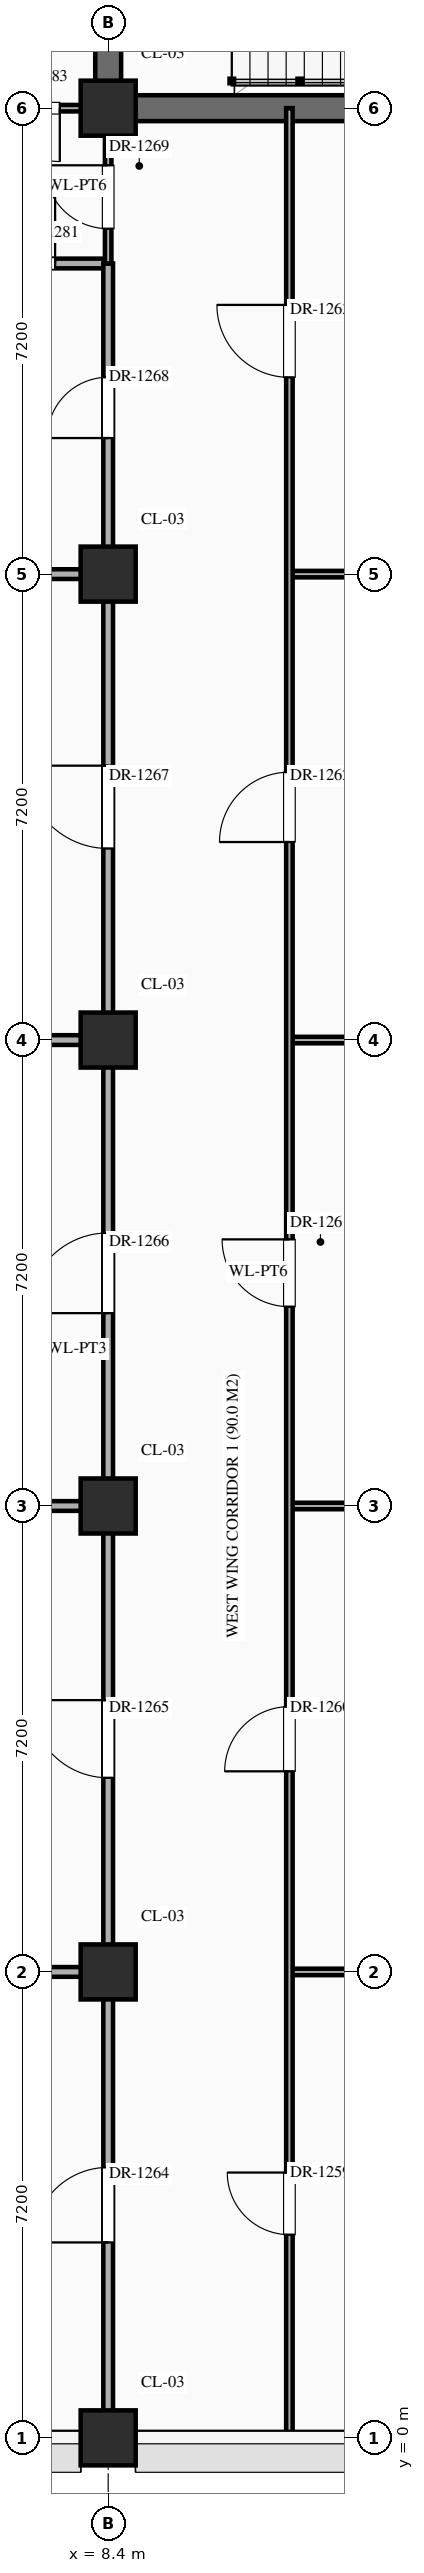
"""IFC4 building model, lengths in metres.
Left out: names, types, materials, properties, quantities, classifications, styles, units other than length and angle.
Written with IfcOpenShell. Run it as: python <this file> out.ifc"""

import sys

from ifc_helpers import new_model, si_unit, direction, frame, frame_2d, origin, origin_2d, place, context, subcontext, project, spatial, rectangle, extrude, element, fill, save


model = new_model("IFC4")
c1 = context("Model", 3, precision=1e-05, world=origin(), true_north=direction((0.0, 1.0)))
c2 = subcontext(c1, "Body", "Model", "MODEL_VIEW")
j1 = project(units=[si_unit("LENGTHUNIT", "METRE"), si_unit("PLANEANGLEUNIT", "RADIAN")], contexts=[c1])
p1 = place(None, origin())
s1 = spatial("IfcSite", under=j1, at=p1, CompositionType="ELEMENT")
p2 = place(p1, origin())
s2 = spatial("IfcBuilding", under=s1, at=p2, CompositionType="ELEMENT")
p3 = place(p2, frame((0.0, 0.0, 5.4)))
s3 = spatial("IfcBuildingStorey", under=s2, at=p3, CompositionType="ELEMENT", Elevation=5.4)
for number, where, z_axis, x_axis in (
    (1, (8.4, 0.0, 0.0), (0.0, 0.0, 1.0), (1.0, 0.0, 0.0)),
    (2, (8.4, 7.2, 0.0), (0.0, 0.0, 1.0), (1.0, 0.0, 0.0)),
    (3, (8.4, 14.4, 0.0), (0.0, 0.0, 1.0), (1.0, 0.0, 0.0)),
    (4, (8.4, 21.6, 0.0), (0.0, 0.0, 1.0), (1.0, 0.0, 0.0)),
    (5, (8.4, 28.8, 0.0), (0.0, 0.0, 1.0), (1.0, 0.0, 0.0)),
    (6, (8.4, 36.0, 0.0), (0.0, 0.0, 1.0), (1.0, 0.0, 0.0)),
):
    element("IfcColumn", number, at=place(p3, frame(where, z_axis=z_axis, x_axis=x_axis)), inside=s3, PredefinedType="COLUMN", context=c2, shape_type="SweptSolid", body=[
        extrude(rectangle(XDim=0.85, YDim=0.85, at=origin_2d()), origin(), (0.0, 0.0, 1.0), 5.4),
    ])
p4 = place(p3, frame((0.04, 7.2, 0.0), z_axis=(0.0, 0.0, 1.0), x_axis=(1.0, 0.0, 0.0)))
e7 = element("IfcWall", 7, at=p4, inside=s3, PredefinedType="STANDARD", context=c2, shape_type="SweptSolid", body=[
    extrude(rectangle(XDim=8.36, YDim=0.15, at=frame_2d((4.18, 0.0))), origin(), (0.0, 0.0, 1.0), 4.2),
])
p5 = place(p3, frame((11.2, 7.2, 0.0), z_axis=(0.0, 0.0, 1.0), x_axis=(1.0, 0.0, 0.0)))
e8 = element("IfcWall", 8, at=p5, inside=s3, PredefinedType="STANDARD", context=c2, shape_type="SweptSolid", body=[
    extrude(rectangle(XDim=5.56, YDim=0.1, at=frame_2d((2.78, 0.0))), origin(), (0.0, 0.0, 1.0), 4.2),
])
p6 = place(p3, frame((0.04, 14.4, 0.0), z_axis=(0.0, 0.0, 1.0), x_axis=(1.0, 0.0, 0.0)))
e9 = element("IfcWall", 9, at=p6, inside=s3, PredefinedType="STANDARD", context=c2, shape_type="SweptSolid", body=[
    extrude(rectangle(XDim=8.36, YDim=0.15, at=frame_2d((4.18, 0.0))), origin(), (0.0, 0.0, 1.0), 4.2),
])
p7 = place(p3, frame((11.2, 14.4, 0.0), z_axis=(0.0, 0.0, 1.0), x_axis=(1.0, 0.0, 0.0)))
e10 = element("IfcWall", 10, at=p7, inside=s3, PredefinedType="STANDARD", context=c2, shape_type="SweptSolid", body=[
    extrude(rectangle(XDim=5.56, YDim=0.1, at=frame_2d((2.78, 0.0))), origin(), (0.0, 0.0, 1.0), 4.2),
])
p8 = place(p3, frame((0.04, 21.6, 0.0), z_axis=(0.0, 0.0, 1.0), x_axis=(1.0, 0.0, 0.0)))
e11 = element("IfcWall", 11, at=p8, inside=s3, PredefinedType="STANDARD", context=c2, shape_type="SweptSolid", body=[
    extrude(rectangle(XDim=8.36, YDim=0.15, at=frame_2d((4.18, 0.0))), origin(), (0.0, 0.0, 1.0), 4.2),
])
p9 = place(p3, frame((11.2, 21.6, 0.0), z_axis=(0.0, 0.0, 1.0), x_axis=(1.0, 0.0, 0.0)))
e12 = element("IfcWall", 12, at=p9, inside=s3, PredefinedType="STANDARD", context=c2, shape_type="SweptSolid", body=[
    extrude(rectangle(XDim=5.56, YDim=0.1, at=frame_2d((2.78, 0.0))), origin(), (0.0, 0.0, 1.0), 4.2),
])
p10 = place(p3, frame((0.04, 28.8, 0.0), z_axis=(0.0, 0.0, 1.0), x_axis=(1.0, 0.0, 0.0)))
e13 = element("IfcWall", 13, at=p10, inside=s3, PredefinedType="STANDARD", context=c2, shape_type="SweptSolid", body=[
    extrude(rectangle(XDim=8.36, YDim=0.15, at=frame_2d((4.18, 0.0))), origin(), (0.0, 0.0, 1.0), 4.2),
])
p11 = place(p3, frame((11.2, 28.8, 0.0), z_axis=(0.0, 0.0, 1.0), x_axis=(1.0, 0.0, 0.0)))
e14 = element("IfcWall", 14, at=p11, inside=s3, PredefinedType="STANDARD", context=c2, shape_type="SweptSolid", body=[
    extrude(rectangle(XDim=5.56, YDim=0.1, at=frame_2d((2.78, 0.0))), origin(), (0.0, 0.0, 1.0), 4.2),
])
p12 = place(p3, frame((0.04, 33.6, 0.0), z_axis=(0.0, 0.0, 1.0), x_axis=(1.0, 0.0, 0.0)))
e15 = element("IfcWall", 15, at=p12, inside=s3, PredefinedType="STANDARD", context=c2, shape_type="SweptSolid", body=[
    extrude(rectangle(XDim=8.36, YDim=0.15, at=frame_2d((4.18, 0.0))), origin(), (0.0, 0.0, 1.0), 5.05),
])
p13 = place(p12, frame((6.38, 0.0, 0.0)))
e16 = element("IfcOpeningElement", 16, at=p13, cuts=e15, PredefinedType="OPENING", context=c2, shape_type="SweptSolid", body=[
    extrude(rectangle(XDim=1.16, YDim=2.3, at=frame_2d((0.58, 1.15))), frame((0.0, 0.087, 0.0), z_axis=(0.0, -1.0, 0.0), x_axis=(1.0, 0.0, 0.0)), (0.0, 0.0, 1.0), 0.174),
])
p14 = place(p3, frame((0.04, 36.0, 0.0), z_axis=(0.0, 0.0, 1.0), x_axis=(1.0, 0.0, 0.0)))
e17 = element("IfcWall", 17, at=p14, inside=s3, PredefinedType="STANDARD", context=c2, shape_type="SweptSolid", body=[
    extrude(rectangle(XDim=8.36, YDim=0.1, at=frame_2d((4.18, 0.0))), origin(), (0.0, 0.0, 1.0), 4.2),
])
p15 = place(p14, frame((5.962, 0.0, 0.0)))
e18 = element("IfcOpeningElement", 18, at=p15, cuts=e17, PredefinedType="OPENING", context=c2, shape_type="SweptSolid", body=[
    extrude(rectangle(XDim=1.65, YDim=2.4, at=frame_2d((0.825, 1.2))), frame((0.0, 0.062, 0.0), z_axis=(0.0, -1.0, 0.0), x_axis=(1.0, 0.0, 0.0)), (0.0, 0.0, 1.0), 0.124),
])
p16 = place(p3, frame((8.4, 36.0, 0.0), z_axis=(0.0, 0.0, 1.0), x_axis=(1.0, 0.0, 0.0)))
e19 = element("IfcWall", 19, at=p16, inside=s3, PredefinedType="SHEAR", context=c2, shape_type="SweptSolid", body=[
    extrude(rectangle(XDim=8.36, YDim=0.4, at=frame_2d((4.18, 0.0))), origin(), (0.0, 0.0, 1.0), 5.05),
])
p17 = place(p3, frame((8.4, 0.04, 0.0), z_axis=(0.0, 0.0, 1.0), x_axis=(0.0, 1.0, 0.0)))
e20 = element("IfcWall", 20, at=p17, inside=s3, PredefinedType="STANDARD", context=c2, shape_type="SweptSolid", body=[
    extrude(rectangle(XDim=33.56, YDim=0.15, at=frame_2d((16.78, 0.0))), origin(), (0.0, 0.0, 1.0), 4.3),
])
p18 = place(p17, frame((2.98, 0.0, 0.0)))
e21 = element("IfcOpeningElement", 21, at=p18, cuts=e20, PredefinedType="OPENING", context=c2, shape_type="SweptSolid", body=[
    extrude(rectangle(XDim=1.16, YDim=2.3, at=frame_2d((0.58, 1.15))), frame((0.0, 0.087, 0.0), z_axis=(0.0, -1.0, 0.0), x_axis=(1.0, 0.0, 0.0)), (0.0, 0.0, 1.0), 0.174),
])
p19 = place(p17, frame((10.16, 0.0, 0.0)))
e22 = element("IfcOpeningElement", 22, at=p19, cuts=e20, PredefinedType="OPENING", context=c2, shape_type="SweptSolid", body=[
    extrude(rectangle(XDim=1.2, YDim=2.35, at=frame_2d((0.6, 1.175))), frame((0.0, 0.087, 0.0), z_axis=(0.0, -1.0, 0.0), x_axis=(1.0, 0.0, 0.0)), (0.0, 0.0, 1.0), 0.174),
])
p20 = place(p17, frame((17.34, 0.0, 0.0)))
e23 = element("IfcOpeningElement", 23, at=p20, cuts=e20, PredefinedType="OPENING", context=c2, shape_type="SweptSolid", body=[
    extrude(rectangle(XDim=1.24, YDim=2.3, at=frame_2d((0.62, 1.15))), frame((0.0, 0.087, 0.0), z_axis=(0.0, -1.0, 0.0), x_axis=(1.0, 0.0, 0.0)), (0.0, 0.0, 1.0), 0.174),
])
p21 = place(p17, frame((24.52, 0.0, 0.0)))
e24 = element("IfcOpeningElement", 24, at=p21, cuts=e20, PredefinedType="OPENING", context=c2, shape_type="SweptSolid", body=[
    extrude(rectangle(XDim=1.28, YDim=2.35, at=frame_2d((0.64, 1.175))), frame((0.0, 0.087, 0.0), z_axis=(0.0, -1.0, 0.0), x_axis=(1.0, 0.0, 0.0)), (0.0, 0.0, 1.0), 0.174),
])
p22 = place(p17, frame((30.863, 0.0, 0.0)))
e25 = element("IfcOpeningElement", 25, at=p22, cuts=e20, PredefinedType="OPENING", context=c2, shape_type="SweptSolid", body=[
    extrude(rectangle(XDim=0.94, YDim=2.3, at=frame_2d((0.47, 1.15))), frame((0.0, 0.087, 0.0), z_axis=(0.0, -1.0, 0.0), x_axis=(1.0, 0.0, 0.0)), (0.0, 0.0, 1.0), 0.174),
])
p23 = place(p3, frame((8.4, 33.6, 0.0), z_axis=(0.0, 0.0, 1.0), x_axis=(0.0, 1.0, 0.0)))
e26 = element("IfcWall", 26, at=p23, inside=s3, PredefinedType="STANDARD", context=c2, shape_type="SweptSolid", body=[
    extrude(rectangle(XDim=2.4, YDim=0.1, at=frame_2d((1.2, 0.0))), origin(), (0.0, 0.0, 1.0), 4.3),
])
p24 = place(p23, frame((0.538, 0.0, 0.0)))
e27 = element("IfcOpeningElement", 27, at=p24, cuts=e26, PredefinedType="OPENING", context=c2, shape_type="SweptSolid", body=[
    extrude(rectangle(XDim=0.98, YDim=2.35, at=frame_2d((0.49, 1.175))), frame((0.0, 0.062, 0.0), z_axis=(0.0, -1.0, 0.0), x_axis=(1.0, 0.0, 0.0)), (0.0, 0.0, 1.0), 0.124),
])
p25 = place(p3, frame((8.4, 36.0, 0.0), z_axis=(0.0, 0.0, 1.0), x_axis=(0.0, 1.0, 0.0)))
e28 = element("IfcWall", 28, at=p25, inside=s3, PredefinedType="SHEAR", context=c2, shape_type="SweptSolid", body=[
    extrude(rectangle(XDim=4.8, YDim=0.4, at=frame_2d((2.4, 0.0))), origin(), (0.0, 0.0, 1.0), 5.12),
])
p26 = place(p3, frame((11.2, 0.04, 0.0), z_axis=(0.0, 0.0, 1.0), x_axis=(0.0, 1.0, 0.0)))
e29 = element("IfcWall", 29, at=p26, inside=s3, PredefinedType="STANDARD", context=c2, shape_type="SweptSolid", body=[
    extrude(rectangle(XDim=35.96, YDim=0.1, at=frame_2d((17.98, 0.0))), origin(), (0.0, 0.0, 1.0), 5.05),
])
p27 = place(p26, frame((3.1, 0.0, 0.0)))
e30 = element("IfcOpeningElement", 30, at=p27, cuts=e29, PredefinedType="OPENING", context=c2, shape_type="SweptSolid", body=[
    extrude(rectangle(XDim=0.96, YDim=2.2, at=frame_2d((0.48, 1.1))), frame((0.0, 0.062, 0.0), z_axis=(0.0, -1.0, 0.0), x_axis=(1.0, 0.0, 0.0)), (0.0, 0.0, 1.0), 0.124),
])
p28 = place(p26, frame((10.26, 0.0, 0.0)))
e31 = element("IfcOpeningElement", 31, at=p28, cuts=e29, PredefinedType="OPENING", context=c2, shape_type="SweptSolid", body=[
    extrude(rectangle(XDim=1.0, YDim=2.25, at=frame_2d((0.5, 1.125))), frame((0.0, 0.062, 0.0), z_axis=(0.0, -1.0, 0.0), x_axis=(1.0, 0.0, 0.0)), (0.0, 0.0, 1.0), 0.124),
])
p29 = place(p26, frame((17.44, 0.0, 0.0)))
e32 = element("IfcOpeningElement", 32, at=p29, cuts=e29, PredefinedType="OPENING", context=c2, shape_type="SweptSolid", body=[
    extrude(rectangle(XDim=1.04, YDim=2.2, at=frame_2d((0.52, 1.1))), frame((0.0, 0.062, 0.0), z_axis=(0.0, -1.0, 0.0), x_axis=(1.0, 0.0, 0.0)), (0.0, 0.0, 1.0), 0.124),
])
p30 = place(p26, frame((24.62, 0.0, 0.0)))
e33 = element("IfcOpeningElement", 33, at=p30, cuts=e29, PredefinedType="OPENING", context=c2, shape_type="SweptSolid", body=[
    extrude(rectangle(XDim=1.08, YDim=2.25, at=frame_2d((0.54, 1.125))), frame((0.0, 0.062, 0.0), z_axis=(0.0, -1.0, 0.0), x_axis=(1.0, 0.0, 0.0)), (0.0, 0.0, 1.0), 0.124),
])
p31 = place(p26, frame((31.8, 0.0, 0.0)))
e34 = element("IfcOpeningElement", 34, at=p31, cuts=e29, PredefinedType="OPENING", context=c2, shape_type="SweptSolid", body=[
    extrude(rectangle(XDim=1.12, YDim=2.25, at=frame_2d((0.56, 1.125))), frame((0.0, 0.062, 0.0), z_axis=(0.0, -1.0, 0.0), x_axis=(1.0, 0.0, 0.0)), (0.0, 0.0, 1.0), 0.124),
])
p32 = place(p27, origin())
e35 = element("IfcDoor", 35, at=p32, inside=s3, OperationType="SINGLE_SWING_RIGHT", PredefinedType="DOOR", context=c2, shape_type="SweptSolid", body=[
    extrude(rectangle(XDim=0.96, YDim=2.2, at=frame_2d((0.48, 1.1))), frame((0.0, 0.025, 0.0), z_axis=(0.0, -1.0, 0.0), x_axis=(1.0, 0.0, 0.0)), (0.0, 0.0, 1.0), 0.05),
])
fill(e30, e35)
p33 = place(p28, origin())
e36 = element("IfcDoor", 36, at=p33, inside=s3, OperationType="SINGLE_SWING_LEFT", PredefinedType="DOOR", context=c2, shape_type="SweptSolid", body=[
    extrude(rectangle(XDim=1.0, YDim=2.25, at=frame_2d((0.5, 1.125))), frame((0.0, 0.025, 0.0), z_axis=(0.0, -1.0, 0.0), x_axis=(1.0, 0.0, 0.0)), (0.0, 0.0, 1.0), 0.05),
])
fill(e31, e36)
p34 = place(p29, origin())
e37 = element("IfcDoor", 37, at=p34, inside=s3, OperationType="SINGLE_SWING_RIGHT", PredefinedType="DOOR", context=c2, shape_type="SweptSolid", body=[
    extrude(rectangle(XDim=1.04, YDim=2.2, at=frame_2d((0.52, 1.1))), frame((0.0, 0.025, 0.0), z_axis=(0.0, -1.0, 0.0), x_axis=(1.0, 0.0, 0.0)), (0.0, 0.0, 1.0), 0.05),
])
fill(e32, e37)
p35 = place(p30, origin())
e38 = element("IfcDoor", 38, at=p35, inside=s3, OperationType="SINGLE_SWING_LEFT", PredefinedType="DOOR", context=c2, shape_type="SweptSolid", body=[
    extrude(rectangle(XDim=1.08, YDim=2.25, at=frame_2d((0.54, 1.125))), frame((0.0, 0.025, 0.0), z_axis=(0.0, -1.0, 0.0), x_axis=(1.0, 0.0, 0.0)), (0.0, 0.0, 1.0), 0.05),
])
fill(e33, e38)
p36 = place(p31, origin())
e39 = element("IfcDoor", 39, at=p36, inside=s3, OperationType="SINGLE_SWING_RIGHT", PredefinedType="DOOR", context=c2, shape_type="SweptSolid", body=[
    extrude(rectangle(XDim=1.12, YDim=2.25, at=frame_2d((0.56, 1.125))), frame((0.0, 0.025, 0.0), z_axis=(0.0, -1.0, 0.0), x_axis=(1.0, 0.0, 0.0)), (0.0, 0.0, 1.0), 0.05),
])
fill(e34, e39)
p37 = place(p18, origin())
e40 = element("IfcDoor", 40, at=p37, inside=s3, OperationType="SINGLE_SWING_LEFT", PredefinedType="DOOR", context=c2, shape_type="SweptSolid", body=[
    extrude(rectangle(XDim=1.16, YDim=2.3, at=frame_2d((0.58, 1.15))), frame((0.0, 0.025, 0.0), z_axis=(0.0, -1.0, 0.0), x_axis=(1.0, 0.0, 0.0)), (0.0, 0.0, 1.0), 0.05),
])
fill(e21, e40)
p38 = place(p19, origin())
e41 = element("IfcDoor", 41, at=p38, inside=s3, OperationType="SINGLE_SWING_RIGHT", PredefinedType="DOOR", context=c2, shape_type="SweptSolid", body=[
    extrude(rectangle(XDim=1.2, YDim=2.35, at=frame_2d((0.6, 1.175))), frame((0.0, 0.025, 0.0), z_axis=(0.0, -1.0, 0.0), x_axis=(1.0, 0.0, 0.0)), (0.0, 0.0, 1.0), 0.05),
])
fill(e22, e41)
p39 = place(p20, origin())
e42 = element("IfcDoor", 42, at=p39, inside=s3, OperationType="SINGLE_SWING_LEFT", PredefinedType="DOOR", context=c2, shape_type="SweptSolid", body=[
    extrude(rectangle(XDim=1.24, YDim=2.3, at=frame_2d((0.62, 1.15))), frame((0.0, 0.025, 0.0), z_axis=(0.0, -1.0, 0.0), x_axis=(1.0, 0.0, 0.0)), (0.0, 0.0, 1.0), 0.05),
])
fill(e23, e42)
p40 = place(p21, origin())
e43 = element("IfcDoor", 43, at=p40, inside=s3, OperationType="SINGLE_SWING_RIGHT", PredefinedType="DOOR", context=c2, shape_type="SweptSolid", body=[
    extrude(rectangle(XDim=1.28, YDim=2.35, at=frame_2d((0.64, 1.175))), frame((0.0, 0.025, 0.0), z_axis=(0.0, -1.0, 0.0), x_axis=(1.0, 0.0, 0.0)), (0.0, 0.0, 1.0), 0.05),
])
fill(e24, e43)
p41 = place(p22, origin())
e44 = element("IfcDoor", 44, at=p41, inside=s3, OperationType="SINGLE_SWING_LEFT", PredefinedType="DOOR", context=c2, shape_type="SweptSolid", body=[
    extrude(rectangle(XDim=0.94, YDim=2.3, at=frame_2d((0.47, 1.15))), frame((0.0, 0.025, 0.0), z_axis=(0.0, -1.0, 0.0), x_axis=(1.0, 0.0, 0.0)), (0.0, 0.0, 1.0), 0.05),
])
fill(e25, e44)
p42 = place(p24, origin())
e45 = element("IfcDoor", 45, at=p42, inside=s3, OperationType="SINGLE_SWING_RIGHT", PredefinedType="DOOR", context=c2, shape_type="SweptSolid", body=[
    extrude(rectangle(XDim=0.98, YDim=2.35, at=frame_2d((0.49, 1.175))), frame((0.0, 0.025, 0.0), z_axis=(0.0, -1.0, 0.0), x_axis=(1.0, 0.0, 0.0)), (0.0, 0.0, 1.0), 0.05),
])
fill(e27, e45)
p43 = place(p13, origin())
e46 = element("IfcDoor", 46, at=p43, inside=s3, OperationType="SINGLE_SWING_RIGHT", PredefinedType="DOOR", context=c2, shape_type="SweptSolid", body=[
    extrude(rectangle(XDim=1.16, YDim=2.3, at=frame_2d((0.58, 1.15))), frame((0.0, 0.025, 0.0), z_axis=(0.0, -1.0, 0.0), x_axis=(1.0, 0.0, 0.0)), (0.0, 0.0, 1.0), 0.05),
])
fill(e16, e46)
p44 = place(p15, frame((1.65, 0.0, 0.0), z_axis=(0.0, 0.0, 1.0), x_axis=(-1.0, 0.0, 0.0)))
e47 = element("IfcDoor", 47, at=p44, inside=s3, OperationType="DOUBLE_DOOR_SINGLE_SWING", PredefinedType="DOOR", context=c2, shape_type="SweptSolid", body=[
    extrude(rectangle(XDim=1.65, YDim=2.4, at=frame_2d((0.825, 1.2))), frame((0.0, 0.025, 0.0), z_axis=(0.0, -1.0, 0.0), x_axis=(1.0, 0.0, 0.0)), (0.0, 0.0, 1.0), 0.05),
])
fill(e18, e47)
save(model, sys.argv[1])
